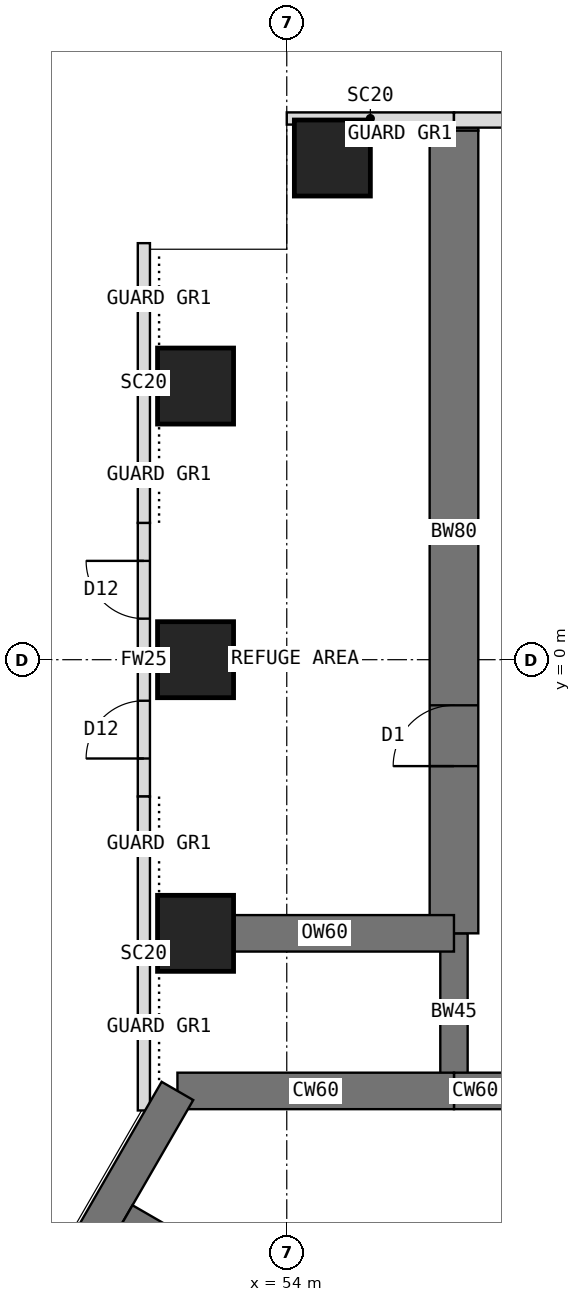
"""IFC4 building model, lengths in metres.
Left out: names, types, materials, properties, quantities, classifications, styles, units other than length and angle.
Written with IfcOpenShell. Run it as: python <this file> out.ifc"""

import sys

from ifc_helpers import new_model, si_unit, direction, frame, frame_2d, origin, origin_2d, place, context, subcontext, project, spatial, rectangle, extrude, element, fill, save


model = new_model("IFC4")
c1 = context("Model", 3, precision=1e-05, world=origin(), true_north=direction((0.0, 1.0)))
c2 = subcontext(c1, "Body", "Model", "MODEL_VIEW")
j1 = project(units=[si_unit("LENGTHUNIT", "METRE"), si_unit("PLANEANGLEUNIT", "RADIAN")], contexts=[c1])
p1 = place(None, origin())
s1 = spatial("IfcSite", under=j1, at=p1, CompositionType="ELEMENT")
p2 = place(p1, origin())
s2 = spatial("IfcBuilding", under=s1, at=p2, CompositionType="ELEMENT")
p3 = place(p2, frame((0.0, 0.0, 165.5)))
s3 = spatial("IfcBuildingStorey", under=s2, at=p3, CompositionType="ELEMENT", Elevation=165.5)
p4 = place(p3, frame((60.25, -7.092, 0.0), z_axis=(0.0, 0.0, 1.0), x_axis=(-1.0, 0.0, 0.0)))
e1 = element("IfcWall", 1, at=p4, inside=s3, PredefinedType="SHEAR", context=c2, shape_type="SweptSolid", body=[
    extrude(rectangle(XDim=3.5, YDim=0.6, at=frame_2d((1.75, 0.0))), origin(), (0.0, 0.0, 1.0), 5.0),
])
p5 = place(p4, frame((0.85, 0.0, 0.0)))
e2 = element("IfcOpeningElement", 2, at=p5, cuts=e1, PredefinedType="OPENING", context=c2, shape_type="SweptSolid", body=[
    extrude(rectangle(XDim=1.8, YDim=2.1, at=frame_2d((0.9, 1.05))), frame((0.0, 0.31, 0.0), z_axis=(0.0, -1.0, 0.0), x_axis=(1.0, 0.0, 0.0)), (0.0, 0.0, 1.0), 0.62),
])
p6 = place(p3, frame((56.75, -7.092, 0.0), z_axis=(0.0, 0.0, 1.0), x_axis=(-1.0, 0.0, 0.0)))
e3 = element("IfcWall", 3, at=p6, inside=s3, PredefinedType="SHEAR", context=c2, shape_type="SweptSolid", body=[
    extrude(rectangle(XDim=4.548, YDim=0.6, at=frame_2d((2.274, 0.0))), origin(), (0.0, 0.0, 1.0), 5.0),
])
p7 = place(p3, frame((52.202, -7.092, 0.0), z_axis=(0.0, 0.0, 1.0), x_axis=(-0.500005998175, -0.866021940709, 0.0)))
e4 = element("IfcWall", 4, at=p7, inside=s3, PredefinedType="SHEAR", context=c2, shape_type="SweptSolid", body=[
    extrude(rectangle(XDim=12.596, YDim=0.6, at=frame_2d((6.298, 0.0))), origin(), (0.0, 0.0, 1.0), 5.0),
])
p8 = place(p3, frame((56.75, -7.092, 0.0), z_axis=(0.0, 0.0, 1.0), x_axis=(0.0, 1.0, 0.0)))
e5 = element("IfcWall", 5, at=p8, inside=s3, PredefinedType="SHEAR", context=c2, shape_type="SweptSolid", body=[
    extrude(rectangle(XDim=2.592, YDim=0.45, at=frame_2d((1.296, 0.0))), origin(), (0.0, 0.0, 1.0), 5.0),
])
p9 = place(p3, frame((56.75, -4.5, 0.0), z_axis=(0.0, 0.0, 1.0), x_axis=(0.0, 1.0, 0.0)))
e6 = element("IfcWall", 6, at=p9, inside=s3, PredefinedType="SHEAR", context=c2, shape_type="SweptSolid", body=[
    extrude(rectangle(XDim=13.2, YDim=0.8, at=frame_2d((6.6, 0.0))), origin(), (0.0, 0.0, 1.0), 5.0),
])
p10 = place(p9, frame((2.75, 0.0, 0.0)))
e7 = element("IfcOpeningElement", 7, at=p10, cuts=e6, PredefinedType="OPENING", context=c2, shape_type="SweptSolid", body=[
    extrude(rectangle(XDim=1.0, YDim=2.1, at=frame_2d((0.5, 1.05))), frame((0.0, 0.41, 0.0), z_axis=(0.0, -1.0, 0.0), x_axis=(1.0, 0.0, 0.0)), (0.0, 0.0, 1.0), 0.82),
])
for number, where, z_axis, x_axis in (
    (8, (52.5, -4.5, 0.0), (0.0, 0.0, 1.0), (1.0, 0.0, 0.0)),
    (9, (52.5, 0.0, 0.0), (0.0, 0.0, 1.0), (1.0, 0.0, 0.0)),
    (10, (52.5, 4.5, 0.0), (0.0, 0.0, 1.0), (1.0, 0.0, 0.0)),
    (11, (54.75, 8.25, 0.0), (0.0, 0.0, 1.0), (1.0, 0.0, 0.0)),
):
    element("IfcColumn", number, at=place(p3, frame(where, z_axis=z_axis, x_axis=x_axis)), inside=s3, PredefinedType="COLUMN", context=c2, shape_type="SweptSolid", body=[
        extrude(rectangle(XDim=1.25, YDim=1.25, at=origin_2d()), origin(), (0.0, 0.0, 1.0), 5.0),
    ])
p11 = place(p3, frame((56.75, -4.5, 0.0), z_axis=(0.0, 0.0, 1.0), x_axis=(-1.0, 0.0, 0.0)))
e12 = element("IfcWall", 12, at=p11, inside=s3, PredefinedType="SHEAR", context=c2, shape_type="SweptSolid", body=[
    extrude(rectangle(XDim=4.25, YDim=0.6, at=frame_2d((2.125, 0.0))), origin(), (0.0, 0.0, 1.0), 5.0),
])
p12 = place(p3, frame((51.65, -7.413, 0.0), z_axis=(0.0, 0.0, 1.0), x_axis=(0.0, 1.0, 0.0)))
e13 = element("IfcWall", 13, at=p12, inside=s3, PredefinedType="USERDEFINED", context=c2, shape_type="SweptSolid", body=[
    extrude(rectangle(XDim=5.163, YDim=0.2, at=frame_2d((2.582, 0.0))), origin(), (0.0, 0.0, 1.0), 4.8),
])
p13 = place(p3, frame((51.65, -2.25, 0.0), z_axis=(0.0, 0.0, 1.0), x_axis=(0.0, 1.0, 0.0)))
e14 = element("IfcWall", 14, at=p13, inside=s3, PredefinedType="STANDARD", context=c2, shape_type="SweptSolid", body=[
    extrude(rectangle(XDim=4.5, YDim=0.2, at=frame_2d((2.25, 0.0))), origin(), (0.0, 0.0, 1.0), 4.8),
])
p14 = place(p13, frame((0.625, 0.0, 0.0)))
e15 = element("IfcOpeningElement", 15, at=p14, cuts=e14, PredefinedType="OPENING", context=c2, shape_type="SweptSolid", body=[
    extrude(rectangle(XDim=0.95, YDim=2.4, at=frame_2d((0.475, 1.2))), frame((0.0, 0.11, 0.0), z_axis=(0.0, -1.0, 0.0), x_axis=(1.0, 0.0, 0.0)), (0.0, 0.0, 1.0), 0.22),
])
p15 = place(p13, frame((2.925, 0.0, 0.0)))
e16 = element("IfcOpeningElement", 16, at=p15, cuts=e14, PredefinedType="OPENING", context=c2, shape_type="SweptSolid", body=[
    extrude(rectangle(XDim=0.95, YDim=2.4, at=frame_2d((0.475, 1.2))), frame((0.0, 0.11, 0.0), z_axis=(0.0, -1.0, 0.0), x_axis=(1.0, 0.0, 0.0)), (0.0, 0.0, 1.0), 0.22),
])
p16 = place(p3, frame((51.65, 2.25, 0.0), z_axis=(0.0, 0.0, 1.0), x_axis=(0.0, 1.0, 0.0)))
e17 = element("IfcWall", 17, at=p16, inside=s3, PredefinedType="USERDEFINED", context=c2, shape_type="SweptSolid", body=[
    extrude(rectangle(XDim=4.6, YDim=0.2, at=frame_2d((2.3, 0.0))), origin(), (0.0, 0.0, 1.0), 4.8),
])
p17 = place(p3, frame((60.25, 8.875, 0.0), z_axis=(0.0, 0.0, 1.0), x_axis=(-1.0, 0.0, 0.0)))
e18 = element("IfcWall", 18, at=p17, inside=s3, PredefinedType="STANDARD", context=c2, shape_type="SweptSolid", body=[
    extrude(rectangle(XDim=3.5, YDim=0.25, at=frame_2d((1.75, 0.0))), origin(), (0.0, 0.0, 1.0), 4.8),
])
p18 = place(p3, frame((56.75, 8.9, 0.0), z_axis=(0.0, 0.0, 1.0), x_axis=(-1.0, 0.0, 0.0)))
e19 = element("IfcWall", 19, at=p18, inside=s3, PredefinedType="USERDEFINED", context=c2, shape_type="SweptSolid", body=[
    extrude(rectangle(XDim=2.75, YDim=0.2, at=frame_2d((1.375, 0.0))), origin(), (0.0, 0.0, 1.0), 4.8),
])
p19 = place(p3, frame((56.75, 8.7, 0.0), z_axis=(0.0, 0.0, 1.0), x_axis=(0.0, 1.0, 0.0)))
e20 = element("IfcWall", 20, at=p19, inside=s3, PredefinedType="PARTITIONING", context=c2, shape_type="SweptSolid", body=[
    extrude(rectangle(XDim=0.05, YDim=0.8, at=frame_2d((0.025, 0.0))), origin(), (0.0, 0.0, 1.0), 4.8),
])
p20 = place(p3, frame((56.48, -12.099, 0.0), z_axis=(0.0, 0.0, 1.0), x_axis=(-0.866009424208, 0.500027676417, 0.0)))
e21 = element("IfcWall", 21, at=p20, inside=s3, PredefinedType="SHEAR", context=c2, shape_type="SweptSolid", body=[
    extrude(rectangle(XDim=5.908, YDim=0.4, at=frame_2d((2.954, 0.0))), origin(), (0.0, 0.0, 1.0), 5.0),
])
p21 = place(p14, origin())
e22 = element("IfcDoor", 22, at=p21, inside=s3, OperationType="SINGLE_SWING_LEFT", PredefinedType="DOOR", context=c2, shape_type="SweptSolid", body=[
    extrude(rectangle(XDim=0.95, YDim=2.4, at=frame_2d((0.475, 1.2))), frame((0.0, 0.025, 0.0), z_axis=(0.0, -1.0, 0.0), x_axis=(1.0, 0.0, 0.0)), (0.0, 0.0, 1.0), 0.05),
])
fill(e15, e22)
p22 = place(p15, origin())
e23 = element("IfcDoor", 23, at=p22, inside=s3, OperationType="SINGLE_SWING_RIGHT", PredefinedType="DOOR", context=c2, shape_type="SweptSolid", body=[
    extrude(rectangle(XDim=0.95, YDim=2.4, at=frame_2d((0.475, 1.2))), frame((0.0, 0.025, 0.0), z_axis=(0.0, -1.0, 0.0), x_axis=(1.0, 0.0, 0.0)), (0.0, 0.0, 1.0), 0.05),
])
fill(e16, e23)
p23 = place(p10, origin())
e24 = element("IfcDoor", 24, at=p23, inside=s3, OperationType="SINGLE_SWING_LEFT", PredefinedType="DOOR", context=c2, shape_type="SweptSolid", body=[
    extrude(rectangle(XDim=0.92, YDim=2.06, at=frame_2d((0.5, 1.03))), frame((0.0, 0.025, 0.0), z_axis=(0.0, -1.0, 0.0), x_axis=(1.0, 0.0, 0.0)), (0.0, 0.0, 1.0), 0.05),
    extrude(rectangle(XDim=0.04, YDim=2.1, at=frame_2d((0.02, 1.05))), frame((0.0, 0.4, 0.0), z_axis=(0.0, -1.0, 0.0), x_axis=(1.0, 0.0, 0.0)), (0.0, 0.0, 1.0), 0.8),
    extrude(rectangle(XDim=0.04, YDim=2.1, at=frame_2d((0.98, 1.05))), frame((0.0, 0.4, 0.0), z_axis=(0.0, -1.0, 0.0), x_axis=(1.0, 0.0, 0.0)), (0.0, 0.0, 1.0), 0.8),
    extrude(rectangle(XDim=0.92, YDim=0.04, at=frame_2d((0.5, 2.08))), frame((0.0, 0.4, 0.0), z_axis=(0.0, -1.0, 0.0), x_axis=(1.0, 0.0, 0.0)), (0.0, 0.0, 1.0), 0.8),
])
fill(e7, e24)
save(model, sys.argv[1])
